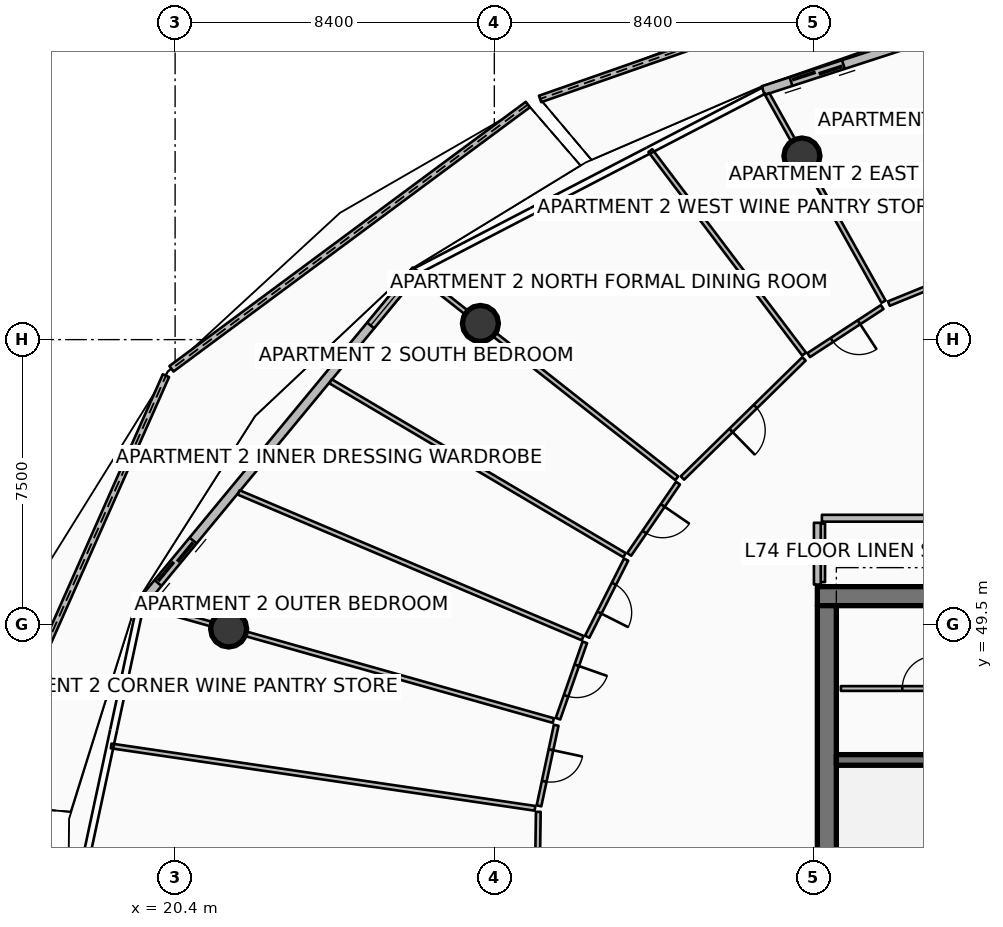
"""IFC4 building model, lengths in metres.
Left out: names, types, materials, properties, quantities, classifications, styles, units other than length and angle.
Written with IfcOpenShell. Run it as: python <this file> out.ifc"""

import sys

from ifc_helpers import new_model, si_unit, direction, frame, frame_2d, origin, origin_2d, place, context, subcontext, project, spatial, polyline, rectangle, circle, outline, extrude, element, fill, save


model = new_model("IFC4")
c1 = context("Model", 3, precision=1e-05, world=origin(), true_north=direction((0.0, 1.0)))
c2 = subcontext(c1, "Body", "Model", "MODEL_VIEW")
j1 = project(units=[si_unit("LENGTHUNIT", "METRE"), si_unit("PLANEANGLEUNIT", "RADIAN")], contexts=[c1])
p1 = place(None, origin())
s1 = spatial("IfcSite", under=j1, at=p1, CompositionType="ELEMENT")
p2 = place(p1, origin())
s2 = spatial("IfcBuilding", under=s1, at=p2, CompositionType="ELEMENT")
p3 = place(p2, frame((0.0, 0.0, 294.45)))
s3 = spatial("IfcBuildingStorey", under=s2, at=p3, CompositionType="ELEMENT", Elevation=294.45)
p4 = place(p3, frame((37.3, 50.25, 0.0), z_axis=(0.0, 0.0, 1.0), x_axis=(1.0, 0.0, 0.0)))
e1 = element("IfcWall", 1, at=p4, inside=s3, PredefinedType="SHEAR", context=c2, shape_type="SweptSolid", body=[
    extrude(rectangle(XDim=9.6, YDim=0.5, at=frame_2d((4.8, 0.0))), origin(), (0.0, 0.0, 1.0), 3.85),
])
p5 = place(p3, frame((37.55, 34.0, 0.0), z_axis=(0.0, 0.0, 1.0), x_axis=(0.0, 1.0, 0.0)))
e2 = element("IfcWall", 2, at=p5, inside=s3, PredefinedType="SHEAR", context=c2, shape_type="SweptSolid", body=[
    extrude(rectangle(XDim=16.0, YDim=0.5, at=frame_2d((8.0, 0.0))), origin(), (0.0, 0.0, 1.0), 3.85),
])
p6 = place(p3, frame((37.8, 45.94, 0.0), z_axis=(0.0, 0.0, 1.0), x_axis=(1.0, 0.0, 0.0)))
e3 = element("IfcWall", 3, at=p6, inside=s3, PredefinedType="SHEAR", context=c2, shape_type="SweptSolid", body=[
    extrude(rectangle(XDim=3.5, YDim=0.28, at=frame_2d((1.75, 0.0))), origin(), (0.0, 0.0, 1.0), 3.85),
])
for number, where, z_axis, x_axis in (
    (4, (36.895, 61.83, 0.0), (0.0, 0.0, 1.0), (1.0, 0.0, 0.0)),
    (5, (28.434, 57.425, 0.0), (0.0, 0.0, 1.0), (1.0, 0.0, 0.0)),
    (6, (21.809, 49.387, 0.0), (0.0, 0.0, 1.0), (1.0, 0.0, 0.0)),
):
    element("IfcColumn", number, at=place(p3, frame(where, z_axis=z_axis, x_axis=x_axis)), inside=s3, PredefinedType="COLUMN", context=c2, shape_type="SweptSolid", body=[
        extrude(circle(Radius=0.475, at=origin_2d()), origin(), (0.0, 0.0, 1.0), 3.59),
    ])
p7 = place(p3, frame((39.827, 66.766, 0.0), z_axis=(0.0, 0.0, 1.0), x_axis=(-0.944003849273, -0.329934436757, 0.0)))
e7 = element("IfcWall", 7, at=p7, inside=s3, PredefinedType="PARAPET", context=c2, shape_type="SweptSolid", body=[
    extrude(outline(polyline([(0.0, 0.0), (10.406, 0.0), (10.406, 1.483), (5.203, 1.284), (0.0, 1.148), (0.0, 0.0)])), frame((0.0, 0.09, 0.0), z_axis=(0.0, -1.0, 0.0), x_axis=(1.0, 0.0, 0.0)), (0.0, 0.0, 1.0), 0.18),
])
p8 = place(p3, frame((29.681, 63.185, 0.0), z_axis=(0.0, 0.0, 1.0), x_axis=(-0.803330402034, -0.59553359701, 0.0)))
e8 = element("IfcWall", 8, at=p8, inside=s3, PredefinedType="PARAPET", context=c2, shape_type="SweptSolid", body=[
    extrude(outline(polyline([(0.0, 0.0), (11.674, 0.0), (11.674, 1.832), (5.837, 1.696), (0.0, 1.497), (0.0, 0.0)])), frame((0.0, 0.09, 0.0), z_axis=(0.0, -1.0, 0.0), x_axis=(1.0, 0.0, 0.0)), (0.0, 0.0, 1.0), 0.18),
])
p9 = place(p3, frame((20.158, 56.052, 0.0), z_axis=(0.0, 0.0, 1.0), x_axis=(-0.405327660322, -0.914171476135, 0.0)))
e9 = element("IfcWall", 9, at=p9, inside=s3, PredefinedType="PARAPET", context=c2, shape_type="SweptSolid", body=[
    extrude(outline(polyline([(0.0, 0.0), (12.323, 0.0), (12.323, 1.756), (6.162, 1.853), (0.0, 1.832), (0.0, 0.0)])), frame((0.0, 0.09, 0.0), z_axis=(0.0, -1.0, 0.0), x_axis=(1.0, 0.0, 0.0)), (0.0, 0.0, 1.0), 0.18),
])
p10 = place(p3, frame((45.142, 66.564, 0.0), z_axis=(0.0, 0.0, 1.0), x_axis=(-0.951055974609, -0.309018661507, 0.0)))
e10 = element("IfcWall", 10, at=p10, inside=s3, PredefinedType="SOLIDWALL", context=c2, shape_type="SweptSolid", body=[
    extrude(rectangle(XDim=9.745, YDim=0.24, at=frame_2d((4.873, 0.0))), origin(), (0.0, 0.0, 1.0), 2.54),
])
p11 = place(p10, frame((7.525, 0.0, 0.0)))
e11 = element("IfcOpeningElement", 11, at=p11, cuts=e10, PredefinedType="OPENING", context=c2, shape_type="SweptSolid", body=[
    extrude(rectangle(XDim=1.45, YDim=2.15, at=frame_2d((0.725, 1.075))), frame((0.0, 0.13, 0.0), z_axis=(0.0, -1.0, 0.0), x_axis=(1.0, 0.0, 0.0)), (0.0, 0.0, 1.0), 0.26),
])
p12 = place(p10, frame((0.28, 0.0, 0.65)))
e12 = element("IfcOpeningElement", 12, at=p12, cuts=e10, PredefinedType="OPENING", context=c2, shape_type="SweptSolid", body=[
    extrude(rectangle(XDim=1.6, YDim=1.5, at=frame_2d((0.8, 0.75))), frame((0.0, 0.13, 0.0), z_axis=(0.0, -1.0, 0.0), x_axis=(1.0, 0.0, 0.0)), (0.0, 0.0, 1.0), 0.26),
])
p13 = place(p3, frame((26.742, 58.822, 0.0), z_axis=(0.0, 0.0, 1.0), x_axis=(-0.636680093065, -0.771128043255, 0.0)))
e13 = element("IfcWall", 13, at=p13, inside=s3, PredefinedType="SOLIDWALL", context=c2, shape_type="SweptSolid", body=[
    extrude(rectangle(XDim=11.438, YDim=0.24, at=frame_2d((5.719, 0.0))), origin(), (0.0, 0.0, 1.0), 2.54),
])
p14 = place(p13, frame((9.218, 0.0, 0.0)))
e14 = element("IfcOpeningElement", 14, at=p14, cuts=e13, PredefinedType="OPENING", context=c2, shape_type="SweptSolid", body=[
    extrude(rectangle(XDim=1.45, YDim=2.15, at=frame_2d((0.725, 1.075))), frame((0.0, 0.13, 0.0), z_axis=(0.0, -1.0, 0.0), x_axis=(1.0, 0.0, 0.0)), (0.0, 0.0, 1.0), 0.26),
])
p15 = place(p13, frame((0.28, 0.0, 0.65)))
e15 = element("IfcOpeningElement", 15, at=p15, cuts=e13, PredefinedType="OPENING", context=c2, shape_type="SweptSolid", body=[
    extrude(rectangle(XDim=1.6, YDim=1.5, at=frame_2d((0.8, 0.75))), frame((0.0, 0.13, 0.0), z_axis=(0.0, -1.0, 0.0), x_axis=(1.0, 0.0, 0.0)), (0.0, 0.0, 1.0), 0.26),
])
p16 = place(p3, frame((37.92, 47.82, 0.0), z_axis=(0.0, 0.0, 1.0), x_axis=(1.0, 0.0, 0.0)))
e16 = element("IfcWall", 16, at=p16, inside=s3, PredefinedType="PARTITIONING", context=c2, shape_type="SweptSolid", body=[
    extrude(rectangle(XDim=4.08, YDim=0.125, at=frame_2d((2.04, 0.0))), origin(), (0.0, 0.0, 1.0), 3.03),
])
p17 = place(p16, frame((1.615, 0.0, 0.0)))
e17 = element("IfcOpeningElement", 17, at=p17, cuts=e16, PredefinedType="OPENING", context=c2, shape_type="SweptSolid", body=[
    extrude(rectangle(XDim=0.85, YDim=2.06, at=frame_2d((0.425, 1.03))), frame((0.0, 0.073, 0.0), z_axis=(0.0, -1.0, 0.0), x_axis=(1.0, 0.0, 0.0)), (0.0, 0.0, 1.0), 0.145),
])
p18 = place(p3, frame((37.44, 50.62, 0.0), z_axis=(0.0, 0.0, 1.0), x_axis=(0.0, 1.0, 0.0)))
e18 = element("IfcWall", 18, at=p18, inside=s3, PredefinedType="PARTITIONING", context=c2, shape_type="SweptSolid", body=[
    extrude(rectangle(XDim=1.54, YDim=0.125, at=frame_2d((0.77, 0.0))), origin(), (0.0, 0.0, 1.0), 3.03),
])
p19 = place(p3, frame((43.204, 59.584, 0.0), z_axis=(0.0, 0.0, 1.0), x_axis=(-0.926332321747, -0.376707352843, 0.0)))
e19 = element("IfcWall", 19, at=p19, inside=s3, PredefinedType="PARTITIONING", context=c2, shape_type="SweptSolid", body=[
    extrude(rectangle(XDim=4.342, YDim=0.125, at=frame_2d((2.171, 0.0))), origin(), (0.0, 0.0, 1.0), 2.957),
])
p20 = place(p19, frame((1.721, 0.0, 0.0)))
e20 = element("IfcOpeningElement", 20, at=p20, cuts=e19, PredefinedType="OPENING", context=c2, shape_type="SweptSolid", body=[
    extrude(rectangle(XDim=0.9, YDim=2.08, at=frame_2d((0.45, 1.04))), frame((0.0, 0.073, 0.0), z_axis=(0.0, -1.0, 0.0), x_axis=(1.0, 0.0, 0.0)), (0.0, 0.0, 1.0), 0.145),
])
p21 = place(p3, frame((42.112, 52.3, 0.0), z_axis=(0.0, 0.0, 1.0), x_axis=(-1.0, 0.0, 0.0)))
e21 = element("IfcWall", 21, at=p21, inside=s3, PredefinedType="PARTITIONING", context=c2, shape_type="SweptSolid", body=[
    extrude(rectangle(XDim=4.692, YDim=0.18, at=frame_2d((2.346, 0.0))), origin(), (0.0, 0.0, 1.0), 2.957),
])
p22 = place(p3, frame((37.3, 52.18, 0.0), z_axis=(0.0, 0.0, 1.0), x_axis=(0.0, -1.0, 0.0)))
e22 = element("IfcWall", 22, at=p22, inside=s3, PredefinedType="PARTITIONING", context=c2, shape_type="SweptSolid", body=[
    extrude(rectangle(XDim=1.625, YDim=0.18, at=frame_2d((0.812, 0.0))), origin(), (0.0, 0.0, 1.0), 2.957),
])
p23 = place(p3, frame((39.041, 57.998, 0.0), z_axis=(0.0, 0.0, 1.0), x_axis=(-0.488617622803, 0.872498033629, 0.0)))
e23 = element("IfcWall", 23, at=p23, inside=s3, PredefinedType="PARTITIONING", context=c2, shape_type="SweptSolid", body=[
    extrude(rectangle(XDim=6.259, YDim=0.125, at=frame_2d((3.129, 0.0))), origin(), (0.0, 0.0, 1.0), 2.957),
])
p24 = place(p3, frame((36.951, 56.62, 0.0), z_axis=(0.0, 0.0, 1.0), x_axis=(-0.602918531989, 0.797802759951, 0.0)))
e24 = element("IfcWall", 24, at=p24, inside=s3, PredefinedType="PARTITIONING", context=c2, shape_type="SweptSolid", body=[
    extrude(rectangle(XDim=6.71, YDim=0.125, at=frame_2d((3.355, 0.0))), origin(), (0.0, 0.0, 1.0), 3.03),
])
p25 = place(p3, frame((39.006, 57.856, 0.0), z_axis=(0.0, 0.0, 1.0), x_axis=(-0.837071991575, -0.547092753489, 0.0)))
e25 = element("IfcWall", 25, at=p25, inside=s3, PredefinedType="PARTITIONING", context=c2, shape_type="SweptSolid", body=[
    extrude(rectangle(XDim=2.31, YDim=0.125, at=frame_2d((1.155, 0.0))), origin(), (0.0, 0.0, 1.0), 2.957),
])
p26 = place(p25, frame((0.73, 0.0, 0.0)))
e26 = element("IfcOpeningElement", 26, at=p26, cuts=e25, PredefinedType="OPENING", context=c2, shape_type="SweptSolid", body=[
    extrude(rectangle(XDim=0.85, YDim=2.06, at=frame_2d((0.425, 1.03))), frame((0.0, 0.073, 0.0), z_axis=(0.0, -1.0, 0.0), x_axis=(1.0, 0.0, 0.0)), (0.0, 0.0, 1.0), 0.145),
])
p27 = place(p3, frame((36.948, 56.493, 0.0), z_axis=(0.0, 0.0, 1.0), x_axis=(-0.714296261594, -0.69984344726, 0.0)))
e27 = element("IfcWall", 27, at=p27, inside=s3, PredefinedType="PARTITIONING", context=c2, shape_type="SweptSolid", body=[
    extrude(rectangle(XDim=4.477, YDim=0.125, at=frame_2d((2.238, 0.0))), origin(), (0.0, 0.0, 1.0), 2.957),
])
p28 = place(p27, frame((1.788, 0.0, 0.0)))
e28 = element("IfcOpeningElement", 28, at=p28, cuts=e27, PredefinedType="OPENING", context=c2, shape_type="SweptSolid", body=[
    extrude(rectangle(XDim=0.9, YDim=2.08, at=frame_2d((0.45, 1.04))), frame((0.0, 0.073, 0.0), z_axis=(0.0, -1.0, 0.0), x_axis=(1.0, 0.0, 0.0)), (0.0, 0.0, 1.0), 0.145),
])
p29 = place(p3, frame((33.601, 53.352, 0.0), z_axis=(0.0, 0.0, 1.0), x_axis=(-0.785335435896, 0.619070475088, 0.0)))
e29 = element("IfcWall", 29, at=p29, inside=s3, PredefinedType="PARTITIONING", context=c2, shape_type="SweptSolid", body=[
    extrude(rectangle(XDim=8.749, YDim=0.125, at=frame_2d((4.374, 0.0))), origin(), (0.0, 0.0, 1.0), 2.957),
])
p30 = place(p3, frame((32.226, 51.329, 0.0), z_axis=(0.0, 0.0, 1.0), x_axis=(-0.860733895342, 0.50905516539, 0.0)))
e30 = element("IfcWall", 30, at=p30, inside=s3, PredefinedType="PARTITIONING", context=c2, shape_type="SweptSolid", body=[
    extrude(rectangle(XDim=8.985, YDim=0.125, at=frame_2d((4.493, 0.0))), origin(), (0.0, 0.0, 1.0), 3.03),
])
p31 = place(p3, frame((31.125, 49.146, 0.0), z_axis=(0.0, 0.0, 1.0), x_axis=(-0.920847570418, 0.389922751395, 0.0)))
e31 = element("IfcWall", 31, at=p31, inside=s3, PredefinedType="PARTITIONING", context=c2, shape_type="SweptSolid", body=[
    extrude(rectangle(XDim=9.83, YDim=0.125, at=frame_2d((4.915, 0.0))), origin(), (0.0, 0.0, 1.0), 3.03),
])
p32 = place(p3, frame((33.634, 53.224, 0.0), z_axis=(0.0, 0.0, 1.0), x_axis=(-0.565361367763, -0.824843332907, 0.0)))
e32 = element("IfcWall", 32, at=p32, inside=s3, PredefinedType="PARTITIONING", context=c2, shape_type="SweptSolid", body=[
    extrude(rectangle(XDim=2.273, YDim=0.125, at=frame_2d((1.137, 0.0))), origin(), (0.0, 0.0, 1.0), 2.957),
])
p33 = place(p32, frame((0.711, 0.0, 0.0)))
e33 = element("IfcOpeningElement", 33, at=p33, cuts=e32, PredefinedType="OPENING", context=c2, shape_type="SweptSolid", body=[
    extrude(rectangle(XDim=0.85, YDim=2.06, at=frame_2d((0.425, 1.03))), frame((0.0, 0.073, 0.0), z_axis=(0.0, -1.0, 0.0), x_axis=(1.0, 0.0, 0.0)), (0.0, 0.0, 1.0), 0.145),
])
p34 = place(p3, frame((32.268, 51.211, 0.0), z_axis=(0.0, 0.0, 1.0), x_axis=(-0.4505614742, -0.892745404898, 0.0)))
e34 = element("IfcWall", 34, at=p34, inside=s3, PredefinedType="PARTITIONING", context=c2, shape_type="SweptSolid", body=[
    extrude(rectangle(XDim=2.273, YDim=0.125, at=frame_2d((1.137, 0.0))), origin(), (0.0, 0.0, 1.0), 3.03),
])
p35 = place(p34, frame((0.712, 0.0, 0.0)))
e35 = element("IfcOpeningElement", 35, at=p35, cuts=e34, PredefinedType="OPENING", context=c2, shape_type="SweptSolid", body=[
    extrude(rectangle(XDim=0.85, YDim=2.06, at=frame_2d((0.425, 1.03))), frame((0.0, 0.073, 0.0), z_axis=(0.0, -1.0, 0.0), x_axis=(1.0, 0.0, 0.0)), (0.0, 0.0, 1.0), 0.145),
])
p36 = place(p3, frame((31.181, 49.035, 0.0), z_axis=(0.0, 0.0, 1.0), x_axis=(-0.331350883475, -0.943507600404, 0.0)))
e36 = element("IfcWall", 36, at=p36, inside=s3, PredefinedType="PARTITIONING", context=c2, shape_type="SweptSolid", body=[
    extrude(rectangle(XDim=2.13, YDim=0.125, at=frame_2d((1.065, 0.0))), origin(), (0.0, 0.0, 1.0), 2.957),
])
p37 = place(p36, frame((0.64, 0.0, 0.0)))
e37 = element("IfcOpeningElement", 37, at=p37, cuts=e36, PredefinedType="OPENING", context=c2, shape_type="SweptSolid", body=[
    extrude(rectangle(XDim=0.85, YDim=2.06, at=frame_2d((0.425, 1.03))), frame((0.0, 0.073, 0.0), z_axis=(0.0, -1.0, 0.0), x_axis=(1.0, 0.0, 0.0)), (0.0, 0.0, 1.0), 0.145),
])
p38 = place(p3, frame((30.353, 46.977, 0.0), z_axis=(0.0, 0.0, 1.0), x_axis=(-0.962452900165, 0.271448733583, 0.0)))
e38 = element("IfcWall", 38, at=p38, inside=s3, PredefinedType="PARTITIONING", context=c2, shape_type="SweptSolid", body=[
    extrude(rectangle(XDim=11.16, YDim=0.125, at=frame_2d((5.58, 0.0))), origin(), (0.0, 0.0, 1.0), 2.957),
])
p39 = place(p3, frame((29.869, 44.667, 0.0), z_axis=(0.0, 0.0, 1.0), x_axis=(-0.989345560315, 0.145586270938, 0.0)))
e39 = element("IfcWall", 39, at=p39, inside=s3, PredefinedType="PARTITIONING", context=c2, shape_type="SweptSolid", body=[
    extrude(rectangle(XDim=11.272, YDim=0.125, at=frame_2d((5.636, 0.0))), origin(), (0.0, 0.0, 1.0), 3.03),
])
p40 = place(p3, frame((30.428, 46.852, 0.0), z_axis=(0.0, 0.0, 1.0), x_axis=(-0.208944429957, -0.977927515305, 0.0)))
e40 = element("IfcWall", 40, at=p40, inside=s3, PredefinedType="PARTITIONING", context=c2, shape_type="SweptSolid", body=[
    extrude(rectangle(XDim=2.167, YDim=0.125, at=frame_2d((1.084, 0.0))), origin(), (0.0, 0.0, 1.0), 2.957),
])
p41 = place(p40, frame((0.659, 0.0, 0.0)))
e41 = element("IfcOpeningElement", 41, at=p41, cuts=e40, PredefinedType="OPENING", context=c2, shape_type="SweptSolid", body=[
    extrude(rectangle(XDim=0.85, YDim=2.06, at=frame_2d((0.425, 1.03))), frame((0.0, 0.073, 0.0), z_axis=(0.0, -1.0, 0.0), x_axis=(1.0, 0.0, 0.0)), (0.0, 0.0, 1.0), 0.145),
])
p42 = place(p3, frame((29.957, 44.574, 0.0), z_axis=(0.0, 0.0, 1.0), x_axis=(-0.014114375014, -0.999900387248, 0.0)))
e42 = element("IfcWall", 42, at=p42, inside=s3, PredefinedType="PARTITIONING", context=c2, shape_type="SweptSolid", body=[
    extrude(rectangle(XDim=4.618, YDim=0.125, at=frame_2d((2.309, 0.0))), origin(), (0.0, 0.0, 1.0), 2.957),
])
p43 = place(p42, frame((1.859, 0.0, 0.0)))
e43 = element("IfcOpeningElement", 43, at=p43, cuts=e42, PredefinedType="OPENING", context=c2, shape_type="SweptSolid", body=[
    extrude(rectangle(XDim=0.9, YDim=2.08, at=frame_2d((0.45, 1.04))), frame((0.0, 0.073, 0.0), z_axis=(0.0, -1.0, 0.0), x_axis=(1.0, 0.0, 0.0)), (0.0, 0.0, 1.0), 0.145),
])
p44 = place(p11, origin())
e44 = element("IfcDoor", 44, at=p44, inside=s3, OperationType="DOUBLE_DOOR_SLIDING", PredefinedType="DOOR", context=c2, shape_type="SweptSolid", body=[
    extrude(rectangle(XDim=1.45, YDim=2.15, at=frame_2d((0.725, 1.075))), frame((0.0, 0.025, 0.0), z_axis=(0.0, -1.0, 0.0), x_axis=(1.0, 0.0, 0.0)), (0.0, 0.0, 1.0), 0.05),
])
fill(e11, e44)
p45 = place(p14, origin())
e45 = element("IfcDoor", 45, at=p45, inside=s3, OperationType="DOUBLE_DOOR_SLIDING", PredefinedType="DOOR", context=c2, shape_type="SweptSolid", body=[
    extrude(rectangle(XDim=1.45, YDim=2.15, at=frame_2d((0.725, 1.075))), frame((0.0, 0.025, 0.0), z_axis=(0.0, -1.0, 0.0), x_axis=(1.0, 0.0, 0.0)), (0.0, 0.0, 1.0), 0.05),
])
fill(e14, e45)
p46 = place(p15, origin())
e46 = element("IfcWindow", 46, at=p46, inside=s3, PartitioningType="SINGLE_PANEL", PredefinedType="WINDOW", context=c2, shape_type="SweptSolid", body=[
    extrude(rectangle(XDim=1.6, YDim=1.5, at=frame_2d((0.8, 0.75))), frame((0.0, 0.03, 0.0), z_axis=(0.0, -1.0, 0.0), x_axis=(1.0, 0.0, 0.0)), (0.0, 0.0, 1.0), 0.06),
])
fill(e15, e46)
p47 = place(p17, origin())
e47 = element("IfcDoor", 47, at=p47, inside=s3, OperationType="SINGLE_SWING_RIGHT", PredefinedType="DOOR", context=c2, shape_type="SweptSolid", body=[
    extrude(rectangle(XDim=0.85, YDim=2.06, at=frame_2d((0.425, 1.03))), frame((0.0, 0.025, 0.0), z_axis=(0.0, -1.0, 0.0), x_axis=(1.0, 0.0, 0.0)), (0.0, 0.0, 1.0), 0.05),
])
fill(e17, e47)
p48 = place(p26, origin())
e48 = element("IfcDoor", 48, at=p48, inside=s3, OperationType="SINGLE_SWING_LEFT", PredefinedType="DOOR", context=c2, shape_type="SweptSolid", body=[
    extrude(rectangle(XDim=0.85, YDim=2.06, at=frame_2d((0.425, 1.03))), frame((0.0, 0.025, 0.0), z_axis=(0.0, -1.0, 0.0), x_axis=(1.0, 0.0, 0.0)), (0.0, 0.0, 1.0), 0.05),
])
fill(e26, e48)
p49 = place(p28, origin())
e49 = element("IfcDoor", 49, at=p49, inside=s3, OperationType="SINGLE_SWING_RIGHT", PredefinedType="DOOR", context=c2, shape_type="SweptSolid", body=[
    extrude(rectangle(XDim=0.9, YDim=2.08, at=frame_2d((0.45, 1.04))), frame((0.0, 0.025, 0.0), z_axis=(0.0, -1.0, 0.0), x_axis=(1.0, 0.0, 0.0)), (0.0, 0.0, 1.0), 0.05),
])
fill(e28, e49)
p50 = place(p33, origin())
e50 = element("IfcDoor", 50, at=p50, inside=s3, OperationType="SINGLE_SWING_LEFT", PredefinedType="DOOR", context=c2, shape_type="SweptSolid", body=[
    extrude(rectangle(XDim=0.85, YDim=2.06, at=frame_2d((0.425, 1.03))), frame((0.0, 0.025, 0.0), z_axis=(0.0, -1.0, 0.0), x_axis=(1.0, 0.0, 0.0)), (0.0, 0.0, 1.0), 0.05),
])
fill(e33, e50)
p51 = place(p35, origin())
e51 = element("IfcDoor", 51, at=p51, inside=s3, OperationType="SINGLE_SWING_RIGHT", PredefinedType="DOOR", context=c2, shape_type="SweptSolid", body=[
    extrude(rectangle(XDim=0.85, YDim=2.06, at=frame_2d((0.425, 1.03))), frame((0.0, 0.025, 0.0), z_axis=(0.0, -1.0, 0.0), x_axis=(1.0, 0.0, 0.0)), (0.0, 0.0, 1.0), 0.05),
])
fill(e35, e51)
p52 = place(p37, origin())
e52 = element("IfcDoor", 52, at=p52, inside=s3, OperationType="SINGLE_SWING_LEFT", PredefinedType="DOOR", context=c2, shape_type="SweptSolid", body=[
    extrude(rectangle(XDim=0.85, YDim=2.06, at=frame_2d((0.425, 1.03))), frame((0.0, 0.025, 0.0), z_axis=(0.0, -1.0, 0.0), x_axis=(1.0, 0.0, 0.0)), (0.0, 0.0, 1.0), 0.05),
])
fill(e37, e52)
p53 = place(p41, origin())
e53 = element("IfcDoor", 53, at=p53, inside=s3, OperationType="SINGLE_SWING_LEFT", PredefinedType="DOOR", context=c2, shape_type="SweptSolid", body=[
    extrude(rectangle(XDim=0.85, YDim=2.06, at=frame_2d((0.425, 1.03))), frame((0.0, 0.025, 0.0), z_axis=(0.0, -1.0, 0.0), x_axis=(1.0, 0.0, 0.0)), (0.0, 0.0, 1.0), 0.05),
])
fill(e41, e53)
save(model, sys.argv[1])
